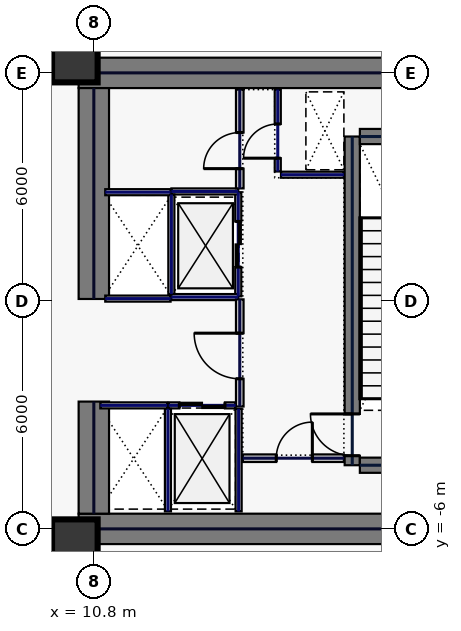
"""IFC4 building model, lengths in metres.
Left out: names, types, materials, properties, quantities, classifications, styles, units other than length and angle.
Written with IfcOpenShell. Run it as: python <this file> out.ifc"""

import sys

from ifc_helpers import new_model, si_unit, direction, frame, frame_2d, origin, origin_2d, place, context, subcontext, project, spatial, rectangle, hollow_rectangle, extrude, element, fill, save


model = new_model("IFC4")
c1 = context("Model", 3, precision=1e-05, world=origin(), true_north=direction((0.0, 1.0)))
c2 = subcontext(c1, "Body", "Model", "MODEL_VIEW")
j1 = project(units=[si_unit("LENGTHUNIT", "METRE"), si_unit("PLANEANGLEUNIT", "RADIAN")], contexts=[c1])
p1 = place(None, origin())
s1 = spatial("IfcSite", under=j1, at=p1, CompositionType="ELEMENT")
p2 = place(p1, origin())
s2 = spatial("IfcBuilding", under=s1, at=p2, CompositionType="ELEMENT")
p3 = place(p2, frame((0.0, 0.0, 23.4)))
s3 = spatial("IfcBuildingStorey", under=s2, at=p3, CompositionType="ELEMENT", Elevation=23.4)
for number, where, z_axis, x_axis in (
    (1, (10.4, 6.0, 0.0), (0.0, 0.0, 1.0), (1.0, 0.0, 0.0)),
    (2, (10.4, -6.0, 0.0), (0.0, 0.0, 1.0), (1.0, 0.0, 0.0)),
):
    element("IfcWall", number, at=place(p3, frame(where, z_axis=z_axis, x_axis=x_axis)), inside=s3, PredefinedType="SHEAR", context=c2, shape_type="SweptSolid", body=[
        extrude(rectangle(XDim=11.6, YDim=0.8, at=frame_2d((5.8, 0.0))), origin(), (0.0, 0.0, 1.0), 4.7),
    ])
p4 = place(p3, frame((10.8, -5.6, 0.0), z_axis=(0.0, 0.0, 1.0), x_axis=(0.0, 1.0, 0.0)))
e3 = element("IfcWall", 3, at=p4, inside=s3, PredefinedType="SHEAR", context=c2, shape_type="SweptSolid", body=[
    extrude(rectangle(XDim=2.95, YDim=0.8, at=frame_2d((1.475, 0.0))), origin(), (0.0, 0.0, 1.0), 4.7),
])
p5 = place(p3, frame((10.8, 0.05, 0.0), z_axis=(0.0, 0.0, 1.0), x_axis=(0.0, 1.0, 0.0)))
e4 = element("IfcWall", 4, at=p5, inside=s3, PredefinedType="SHEAR", context=c2, shape_type="SweptSolid", body=[
    extrude(rectangle(XDim=5.55, YDim=0.8, at=frame_2d((2.775, 0.0))), origin(), (0.0, 0.0, 1.0), 4.7),
])
p6 = place(p3, frame((17.6, -4.325, 0.0), z_axis=(0.0, 0.0, 1.0), x_axis=(0.0, 1.0, 0.0)))
e5 = element("IfcWall", 5, at=p6, inside=s3, PredefinedType="SHEAR", context=c2, shape_type="SweptSolid", body=[
    extrude(rectangle(XDim=8.65, YDim=0.4, at=frame_2d((4.325, 0.0))), origin(), (0.0, 0.0, 1.0), 4.7),
])
p7 = place(p6, frame((0.25, 0.0, 0.0)))
e6 = element("IfcOpeningElement", 6, at=p7, cuts=e5, PredefinedType="OPENING", context=c2, shape_type="SweptSolid", body=[
    extrude(rectangle(XDim=1.1, YDim=2.2, at=frame_2d((0.55, 1.1))), frame((0.0, 0.21, 0.0), z_axis=(0.0, -1.0, 0.0), x_axis=(1.0, 0.0, 0.0)), (0.0, 0.0, 1.0), 0.42),
])
for number, where, z_axis, x_axis in (
    (7, (17.8, -4.325, 0.0), (0.0, 0.0, 1.0), (1.0, 0.0, 0.0)),
    (8, (17.8, 4.325, 0.0), (0.0, 0.0, 1.0), (1.0, 0.0, 0.0)),
):
    element("IfcWall", number, at=place(p3, frame(where, z_axis=z_axis, x_axis=x_axis)), inside=s3, PredefinedType="SHEAR", context=c2, shape_type="SweptSolid", body=[
        extrude(rectangle(XDim=3.4, YDim=0.4, at=frame_2d((1.7, 0.0))), origin(), (0.0, 0.0, 1.0), 4.7),
    ])
for number, where, z_axis, x_axis in (
    (9, (10.3, -6.35, 0.0), (0.0, 0.0, 1.0), (1.0, 0.0, 0.0)),
    (10, (10.3, 6.35, 0.0), (0.0, 0.0, 1.0), (1.0, 0.0, 0.0)),
):
    element("IfcColumn", number, at=place(p3, frame(where, z_axis=z_axis, x_axis=x_axis)), inside=s3, PredefinedType="COLUMN", context=c2, shape_type="SweptSolid", body=[
        extrude(hollow_rectangle(XDim=1.2, YDim=1.2, WallThickness=0.05, at=origin_2d()), origin(), (0.0, 0.0, 1.0), 4.7),
    ])
p8 = place(p3, frame((14.6, 0.12, 0.0), z_axis=(0.0, 0.0, 1.0), x_axis=(0.0, 1.0, 0.0)))
e11 = element("IfcWall", 11, at=p8, inside=s3, PredefinedType="PARTITIONING", context=c2, shape_type="SweptSolid", body=[
    extrude(rectangle(XDim=2.74, YDim=0.16, at=frame_2d((1.37, 0.0))), origin(), (0.0, 0.0, 1.0), 4.7),
])
p9 = place(p8, frame((0.77, 0.0, 0.0)))
e12 = element("IfcOpeningElement", 12, at=p9, cuts=e11, PredefinedType="OPENING", context=c2, shape_type="SweptSolid", body=[
    extrude(rectangle(XDim=1.2, YDim=2.2, at=frame_2d((0.6, 1.1))), frame((0.0, 0.09, 0.0), z_axis=(0.0, -1.0, 0.0), x_axis=(1.0, 0.0, 0.0)), (0.0, 0.0, 1.0), 0.18),
])
for number, where, z_axis, x_axis in (
    (13, (12.84, 0.1, 0.0), (0.0, 0.0, 1.0), (1.0, 0.0, 0.0)),
    (14, (12.84, 2.88, 0.0), (0.0, 0.0, 1.0), (1.0, 0.0, 0.0)),
):
    element("IfcWall", number, at=place(p3, frame(where, z_axis=z_axis, x_axis=x_axis)), inside=s3, PredefinedType="PARTITIONING", context=c2, shape_type="SweptSolid", body=[
        extrude(rectangle(XDim=1.76, YDim=0.16, at=frame_2d((0.88, 0.0))), origin(), (0.0, 0.0, 1.0), 4.7),
    ])
p10 = place(p3, frame((12.84, 0.18, 0.0), z_axis=(0.0, 0.0, 1.0), x_axis=(0.0, 1.0, 0.0)))
e15 = element("IfcWall", 15, at=p10, inside=s3, PredefinedType="PARTITIONING", context=c2, shape_type="SweptSolid", body=[
    extrude(rectangle(XDim=2.62, YDim=0.16, at=frame_2d((1.31, 0.0))), origin(), (0.0, 0.0, 1.0), 4.7),
])
p11 = place(p3, frame((12.77, -2.75, 0.0), z_axis=(0.0, 0.0, 1.0), x_axis=(1.0, 0.0, 0.0)))
e16 = element("IfcWall", 16, at=p11, inside=s3, PredefinedType="PARTITIONING", context=c2, shape_type="SweptSolid", body=[
    extrude(rectangle(XDim=1.76, YDim=0.16, at=frame_2d((0.88, 0.0))), origin(), (0.0, 0.0, 1.0), 4.7),
])
p12 = place(p11, frame((0.28, 0.0, 0.0)))
e17 = element("IfcOpeningElement", 17, at=p12, cuts=e16, PredefinedType="OPENING", context=c2, shape_type="SweptSolid", body=[
    extrude(rectangle(XDim=1.2, YDim=2.2, at=frame_2d((0.6, 1.1))), frame((0.0, 0.09, 0.0), z_axis=(0.0, -1.0, 0.0), x_axis=(1.0, 0.0, 0.0)), (0.0, 0.0, 1.0), 0.18),
])
for number, where, z_axis, x_axis in (
    (18, (12.75, -5.54, 0.0), (0.0, 0.0, 1.0), (0.0, 1.0, 0.0)),
    (19, (14.61, -5.54, 0.0), (0.0, 0.0, 1.0), (0.0, 1.0, 0.0)),
):
    element("IfcWall", number, at=place(p3, frame(where, z_axis=z_axis, x_axis=x_axis)), inside=s3, PredefinedType="PARTITIONING", context=c2, shape_type="SweptSolid", body=[
        extrude(rectangle(XDim=2.7, YDim=0.16, at=frame_2d((1.35, 0.0))), origin(), (0.0, 0.0, 1.0), 4.7),
    ])
p13 = place(p3, frame((10.97, -2.75, 0.0), z_axis=(0.0, 0.0, 1.0), x_axis=(1.0, 0.0, 0.0)))
e20 = element("IfcWall", 20, at=p13, inside=s3, PredefinedType="PARTITIONING", context=c2, shape_type="SweptSolid", body=[
    extrude(rectangle(XDim=1.76, YDim=0.16, at=frame_2d((0.88, 0.0))), origin(), (0.0, 0.0, 1.0), 4.7),
])
for number, where, z_axis, x_axis in (
    (21, (11.1, 0.06, 0.0), (0.0, 0.0, 1.0), (1.0, 0.0, 0.0)),
    (22, (11.1, 2.86, 0.0), (0.0, 0.0, 1.0), (1.0, 0.0, 0.0)),
):
    element("IfcWall", number, at=place(p3, frame(where, z_axis=z_axis, x_axis=x_axis)), inside=s3, PredefinedType="PARTITIONING", context=c2, shape_type="SweptSolid", body=[
        extrude(rectangle(XDim=1.72, YDim=0.16, at=frame_2d((0.86, 0.0))), origin(), (0.0, 0.0, 1.0), 4.7),
    ])
p14 = place(p3, frame((15.64, 3.405, 0.0), z_axis=(0.0, 0.0, 1.0), x_axis=(0.0, 1.0, 0.0)))
e23 = element("IfcWall", 23, at=p14, inside=s3, PredefinedType="PARTITIONING", context=c2, shape_type="SweptSolid", body=[
    extrude(rectangle(XDim=2.155, YDim=0.16, at=frame_2d((1.078, 0.0))), origin(), (0.0, 0.0, 1.0), 4.7),
])
p15 = place(p14, frame((0.35, 0.0, 0.0)))
e24 = element("IfcOpeningElement", 24, at=p15, cuts=e23, PredefinedType="OPENING", context=c2, shape_type="SweptSolid", body=[
    extrude(rectangle(XDim=0.9, YDim=2.2, at=frame_2d((0.45, 1.1))), frame((0.0, 0.09, 0.0), z_axis=(0.0, -1.0, 0.0), x_axis=(1.0, 0.0, 0.0)), (0.0, 0.0, 1.0), 0.18),
])
p16 = place(p3, frame((15.725, 3.32, 0.0), z_axis=(0.0, 0.0, 1.0), x_axis=(1.0, 0.0, 0.0)))
e25 = element("IfcWall", 25, at=p16, inside=s3, PredefinedType="PARTITIONING", context=c2, shape_type="SweptSolid", body=[
    extrude(rectangle(XDim=1.655, YDim=0.16, at=frame_2d((0.827, 0.0))), origin(), (0.0, 0.0, 1.0), 4.7),
])
p17 = place(p3, frame((14.72, -4.14, 0.0), z_axis=(0.0, 0.0, 1.0), x_axis=(1.0, 0.0, 0.0)))
e26 = element("IfcWall", 26, at=p17, inside=s3, PredefinedType="SOLIDWALL", context=c2, shape_type="SweptSolid", body=[
    extrude(rectangle(XDim=2.66, YDim=0.2, at=frame_2d((1.33, 0.0))), origin(), (0.0, 0.0, 1.0), 4.7),
])
p18 = place(p17, frame((0.88, 0.0, 0.0)))
e27 = element("IfcOpeningElement", 27, at=p18, cuts=e26, PredefinedType="OPENING", context=c2, shape_type="SweptSolid", body=[
    extrude(rectangle(XDim=0.95, YDim=2.2, at=frame_2d((0.475, 1.1))), frame((0.0, 0.11, 0.0), z_axis=(0.0, -1.0, 0.0), x_axis=(1.0, 0.0, 0.0)), (0.0, 0.0, 1.0), 0.22),
])
p19 = place(p3, frame((14.64, 2.96, 0.0), z_axis=(0.0, 0.0, 1.0), x_axis=(0.0, 1.0, 0.0)))
e28 = element("IfcWall", 28, at=p19, inside=s3, PredefinedType="SOLIDWALL", context=c2, shape_type="SweptSolid", body=[
    extrude(rectangle(XDim=2.6, YDim=0.2, at=frame_2d((1.3, 0.0))), origin(), (0.0, 0.0, 1.0), 4.7),
])
p20 = place(p19, frame((0.52, 0.0, 0.0)))
e29 = element("IfcOpeningElement", 29, at=p20, cuts=e28, PredefinedType="OPENING", context=c2, shape_type="SweptSolid", body=[
    extrude(rectangle(XDim=0.95, YDim=2.2, at=frame_2d((0.475, 1.1))), frame((0.0, 0.11, 0.0), z_axis=(0.0, -1.0, 0.0), x_axis=(1.0, 0.0, 0.0)), (0.0, 0.0, 1.0), 0.22),
])
p21 = place(p3, frame((14.64, -2.78, 0.0), z_axis=(0.0, 0.0, 1.0), x_axis=(0.0, 1.0, 0.0)))
e30 = element("IfcWall", 30, at=p21, inside=s3, PredefinedType="SOLIDWALL", context=c2, shape_type="SweptSolid", body=[
    extrude(rectangle(XDim=2.82, YDim=0.2, at=frame_2d((1.41, 0.0))), origin(), (0.0, 0.0, 1.0), 4.7),
])
p22 = place(p21, frame((0.73, 0.0, 0.0)))
e31 = element("IfcOpeningElement", 31, at=p22, cuts=e30, PredefinedType="OPENING", context=c2, shape_type="SweptSolid", body=[
    extrude(rectangle(XDim=1.2, YDim=2.2, at=frame_2d((0.6, 1.1))), frame((0.0, 0.11, 0.0), z_axis=(0.0, -1.0, 0.0), x_axis=(1.0, 0.0, 0.0)), (0.0, 0.0, 1.0), 0.22),
])
for number, where, z_axis, x_axis in (
    (32, (10.58, 7.485, 0.0), (0.0, 0.0, 1.0), (0.0, -1.0, 0.0)),
    (33, (10.58, -6.42, 0.0), (0.0, 0.0, 1.0), (0.0, -1.0, 0.0)),
):
    element("IfcWall", number, at=place(p3, frame(where, z_axis=z_axis, x_axis=x_axis)), inside=s3, PredefinedType="PARTITIONING", context=c2, shape_type="SweptSolid", body=[
        extrude(rectangle(XDim=1.065, YDim=0.16, at=frame_2d((0.533, 0.0))), origin(), (0.0, 0.0, 1.0), 4.7),
    ])
p23 = place(p7, origin())
e34 = element("IfcDoor", 34, at=p23, inside=s3, OperationType="SINGLE_SWING_RIGHT", PredefinedType="DOOR", context=c2, shape_type="SweptSolid", body=[
    extrude(rectangle(XDim=1.1, YDim=2.2, at=frame_2d((0.55, 1.1))), frame((0.0, 0.025, 0.0), z_axis=(0.0, -1.0, 0.0), x_axis=(1.0, 0.0, 0.0)), (0.0, 0.0, 1.0), 0.05),
])
fill(e6, e34)
p24 = place(p9, origin())
e35 = element("IfcDoor", 35, at=p24, inside=s3, OperationType="SLIDING_TO_LEFT", PredefinedType="DOOR", context=c2, shape_type="SweptSolid", body=[
    extrude(rectangle(XDim=1.2, YDim=2.2, at=frame_2d((0.6, 1.1))), frame((0.0, 0.025, 0.0), z_axis=(0.0, -1.0, 0.0), x_axis=(1.0, 0.0, 0.0)), (0.0, 0.0, 1.0), 0.05),
])
fill(e12, e35)
p25 = place(p12, origin())
e36 = element("IfcDoor", 36, at=p25, inside=s3, OperationType="SLIDING_TO_LEFT", PredefinedType="DOOR", context=c2, shape_type="SweptSolid", body=[
    extrude(rectangle(XDim=1.2, YDim=2.2, at=frame_2d((0.6, 1.1))), frame((0.0, 0.025, 0.0), z_axis=(0.0, -1.0, 0.0), x_axis=(1.0, 0.0, 0.0)), (0.0, 0.0, 1.0), 0.05),
])
fill(e17, e36)
p26 = place(p15, origin())
e37 = element("IfcDoor", 37, at=p26, inside=s3, OperationType="SINGLE_SWING_LEFT", PredefinedType="DOOR", context=c2, shape_type="SweptSolid", body=[
    extrude(rectangle(XDim=0.9, YDim=2.2, at=frame_2d((0.45, 1.1))), frame((0.0, 0.025, 0.0), z_axis=(0.0, -1.0, 0.0), x_axis=(1.0, 0.0, 0.0)), (0.0, 0.0, 1.0), 0.05),
])
fill(e24, e37)
p27 = place(p18, origin())
e38 = element("IfcDoor", 38, at=p27, inside=s3, OperationType="SINGLE_SWING_RIGHT", PredefinedType="DOOR", context=c2, shape_type="SweptSolid", body=[
    extrude(rectangle(XDim=0.95, YDim=2.2, at=frame_2d((0.475, 1.1))), frame((0.0, 0.025, 0.0), z_axis=(0.0, -1.0, 0.0), x_axis=(1.0, 0.0, 0.0)), (0.0, 0.0, 1.0), 0.05),
])
fill(e27, e38)
p28 = place(p20, origin())
e39 = element("IfcDoor", 39, at=p28, inside=s3, OperationType="SINGLE_SWING_LEFT", PredefinedType="DOOR", context=c2, shape_type="SweptSolid", body=[
    extrude(rectangle(XDim=0.95, YDim=2.2, at=frame_2d((0.475, 1.1))), frame((0.0, 0.025, 0.0), z_axis=(0.0, -1.0, 0.0), x_axis=(1.0, 0.0, 0.0)), (0.0, 0.0, 1.0), 0.05),
])
fill(e29, e39)
p29 = place(p22, origin())
e40 = element("IfcDoor", 40, at=p29, inside=s3, OperationType="SINGLE_SWING_RIGHT", PredefinedType="DOOR", context=c2, shape_type="SweptSolid", body=[
    extrude(rectangle(XDim=1.2, YDim=2.2, at=frame_2d((0.6, 1.1))), frame((0.0, 0.025, 0.0), z_axis=(0.0, -1.0, 0.0), x_axis=(1.0, 0.0, 0.0)), (0.0, 0.0, 1.0), 0.05),
])
fill(e31, e40)
save(model, sys.argv[1])
